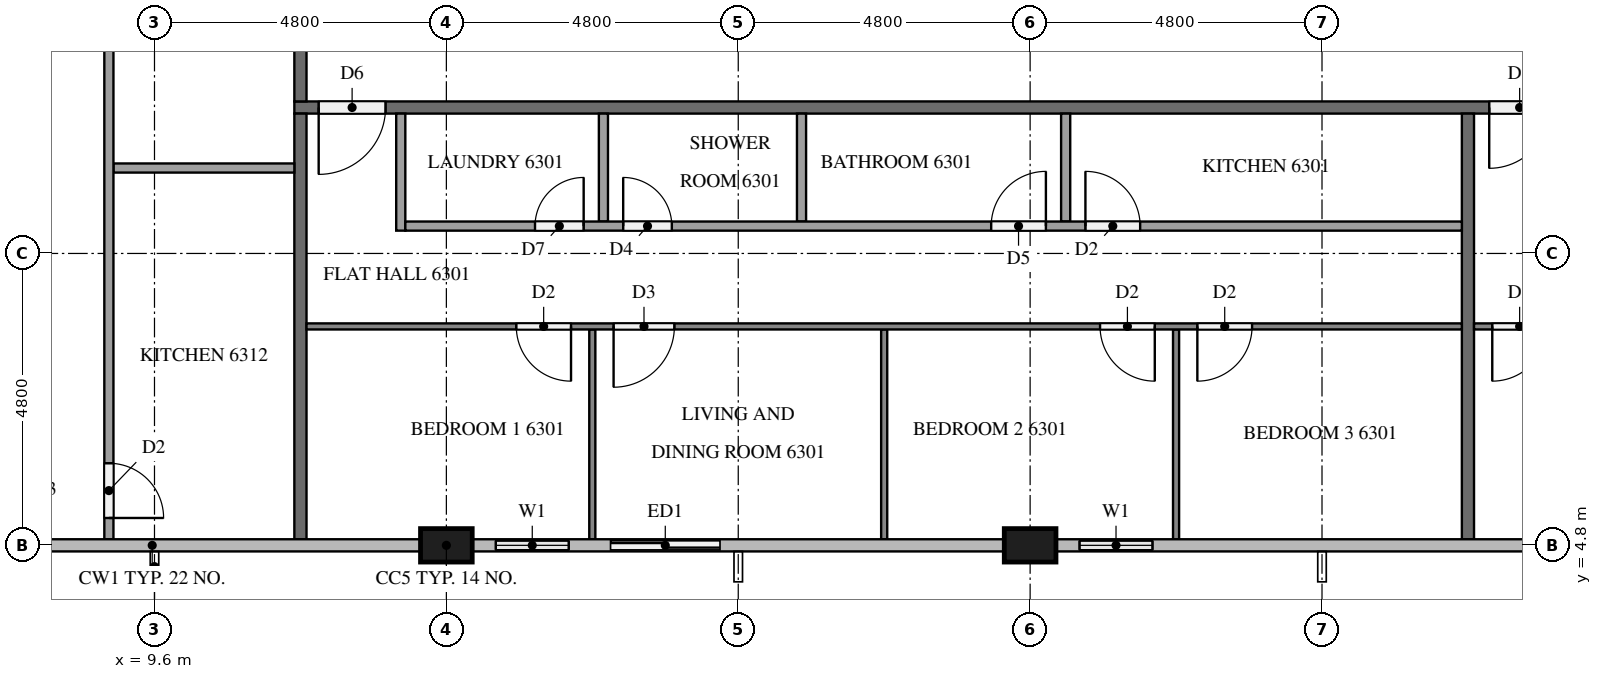
"""IFC4 building model, lengths in metres.
Left out: names, types, materials, properties, quantities, classifications, styles, units other than length and angle.
Written with IfcOpenShell. Run it as: python <this file> out.ifc"""

import sys

from ifc_helpers import new_model, si_unit, direction, frame, frame_2d, origin, origin_2d, place, context, subcontext, project, spatial, rectangle, extrude, element, fill, save


model = new_model("IFC4")
c1 = context("Model", 3, precision=1e-05, world=origin(), true_north=direction((0.0, 1.0)))
c2 = subcontext(c1, "Body", "Model", "MODEL_VIEW")
j1 = project(units=[si_unit("LENGTHUNIT", "METRE"), si_unit("PLANEANGLEUNIT", "RADIAN")], contexts=[c1])
p1 = place(None, origin())
s1 = spatial("IfcSite", under=j1, at=p1, CompositionType="ELEMENT")
p2 = place(p1, origin())
s2 = spatial("IfcBuilding", under=s1, at=p2, CompositionType="ELEMENT")
p3 = place(p2, frame((0.0, 0.0, 242.2)))
s3 = spatial("IfcBuildingStorey", under=s2, at=p3, CompositionType="ELEMENT", Elevation=242.2)
for number, where, z_axis, x_axis in (
    (1, (14.4, 4.8, 0.0), (0.0, 0.0, 1.0), (1.0, 0.0, 0.0)),
    (2, (24.0, 4.8, 0.0), (0.0, 0.0, 1.0), (1.0, 0.0, 0.0)),
):
    element("IfcColumn", number, at=place(p3, frame(where, z_axis=z_axis, x_axis=x_axis)), inside=s3, PredefinedType="COLUMN", context=c2, shape_type="SweptSolid", body=[
        extrude(rectangle(XDim=0.85, YDim=0.55, at=origin_2d()), origin(), (0.0, 0.0, 1.0), 3.2),
    ])
p4 = place(p3, frame((14.825, 4.8, 0.0), z_axis=(0.0, 0.0, 1.0), x_axis=(1.0, 0.0, 0.0)))
e3 = element("IfcWall", 3, at=p4, inside=s3, PredefinedType="SOLIDWALL", context=c2, shape_type="SweptSolid", body=[
    extrude(rectangle(XDim=4.375, YDim=0.15, at=frame_2d((2.188, 0.0))), origin(), (0.0, 0.0, 1.0), 3.2),
])
p5 = place(p4, frame((0.387, 0.0, 0.9)))
e4 = element("IfcOpeningElement", 4, at=p5, cuts=e3, PredefinedType="OPENING", context=c2, shape_type="SweptSolid", body=[
    extrude(rectangle(XDim=1.2, YDim=1.4, at=frame_2d((0.6, 0.7))), frame((0.0, 0.085, 0.0), z_axis=(0.0, -1.0, 0.0), x_axis=(1.0, 0.0, 0.0)), (0.0, 0.0, 1.0), 0.17),
])
p6 = place(p4, frame((2.275, 0.0, 0.0)))
e5 = element("IfcOpeningElement", 5, at=p6, cuts=e3, PredefinedType="OPENING", context=c2, shape_type="SweptSolid", body=[
    extrude(rectangle(XDim=1.8, YDim=2.4, at=frame_2d((0.9, 1.2))), frame((0.0, 0.085, 0.0), z_axis=(0.0, -1.0, 0.0), x_axis=(1.0, 0.0, 0.0)), (0.0, 0.0, 1.0), 0.17),
])
p7 = place(p3, frame((24.425, 4.8, 0.0), z_axis=(0.0, 0.0, 1.0), x_axis=(1.0, 0.0, 0.0)))
e6 = element("IfcWall", 6, at=p7, inside=s3, PredefinedType="SOLIDWALL", context=c2, shape_type="SweptSolid", body=[
    extrude(rectangle(XDim=1.975, YDim=0.15, at=frame_2d((0.987, 0.0))), origin(), (0.0, 0.0, 1.0), 3.2),
])
p8 = place(p7, frame((0.387, 0.0, 0.9)))
e7 = element("IfcOpeningElement", 7, at=p8, cuts=e6, PredefinedType="OPENING", context=c2, shape_type="SweptSolid", body=[
    extrude(rectangle(XDim=1.2, YDim=1.4, at=frame_2d((0.6, 0.7))), frame((0.0, 0.085, 0.0), z_axis=(0.0, -1.0, 0.0), x_axis=(1.0, 0.0, 0.0)), (0.0, 0.0, 1.0), 0.17),
])
p9 = place(p3, frame((50.5, 12.0, 0.0), z_axis=(0.0, 0.0, 1.0), x_axis=(-1.0, 0.0, 0.0)))
e8 = element("IfcWall", 8, at=p9, inside=s3, PredefinedType="PARTITIONING", context=c2, shape_type="SweptSolid", body=[
    extrude(rectangle(XDim=38.6, YDim=0.2, at=frame_2d((19.3, 0.0))), origin(), (0.0, 0.0, 1.0), 3.2),
])
p10 = place(p9, frame((37.1, 0.0, 0.0)))
e9 = element("IfcOpeningElement", 9, at=p10, cuts=e8, PredefinedType="OPENING", context=c2, shape_type="SweptSolid", body=[
    extrude(rectangle(XDim=1.1, YDim=2.1, at=frame_2d((0.55, 1.05))), frame((0.0, 0.11, 0.0), z_axis=(0.0, -1.0, 0.0), x_axis=(1.0, 0.0, 0.0)), (0.0, 0.0, 1.0), 0.22),
])
p11 = place(p9, frame((17.95, 0.0, 0.0)))
e10 = element("IfcOpeningElement", 10, at=p11, cuts=e8, PredefinedType="OPENING", context=c2, shape_type="SweptSolid", body=[
    extrude(rectangle(XDim=1.0, YDim=2.1, at=frame_2d((0.5, 1.05))), frame((0.0, 0.11, 0.0), z_axis=(0.0, -1.0, 0.0), x_axis=(1.0, 0.0, 0.0)), (0.0, 0.0, 1.0), 0.22),
])
p12 = place(p9, frame((8.35, 0.0, 0.0)))
e11 = element("IfcOpeningElement", 11, at=p12, cuts=e8, PredefinedType="OPENING", context=c2, shape_type="SweptSolid", body=[
    extrude(rectangle(XDim=1.0, YDim=2.1, at=frame_2d((0.5, 1.05))), frame((0.0, 0.11, 0.0), z_axis=(0.0, -1.0, 0.0), x_axis=(1.0, 0.0, 0.0)), (0.0, 0.0, 1.0), 0.22),
])
p13 = place(p3, frame((12.0, 12.1, 0.0), z_axis=(0.0, 0.0, 1.0), x_axis=(0.0, 1.0, 0.0)))
e12 = element("IfcWall", 12, at=p13, inside=s3, PredefinedType="PARTITIONING", context=c2, shape_type="SweptSolid", body=[
    extrude(rectangle(XDim=28.6, YDim=0.2, at=frame_2d((14.3, 0.0))), origin(), (0.0, 0.0, 1.0), 3.2),
])
p14 = place(p13, frame((27.35, 0.0, 0.0)))
e13 = element("IfcOpeningElement", 13, at=p14, cuts=e12, PredefinedType="OPENING", context=c2, shape_type="SweptSolid", body=[
    extrude(rectangle(XDim=1.0, YDim=2.1, at=frame_2d((0.5, 1.05))), frame((0.0, 0.11, 0.0), z_axis=(0.0, -1.0, 0.0), x_axis=(1.0, 0.0, 0.0)), (0.0, 0.0, 1.0), 0.22),
])
p15 = place(p13, frame((17.75, 0.0, 0.0)))
e14 = element("IfcOpeningElement", 14, at=p15, cuts=e12, PredefinedType="OPENING", context=c2, shape_type="SweptSolid", body=[
    extrude(rectangle(XDim=1.0, YDim=2.1, at=frame_2d((0.5, 1.05))), frame((0.0, 0.11, 0.0), z_axis=(0.0, -1.0, 0.0), x_axis=(1.0, 0.0, 0.0)), (0.0, 0.0, 1.0), 0.22),
])
p16 = place(p13, frame((3.35, 0.0, 0.0)))
e15 = element("IfcOpeningElement", 15, at=p16, cuts=e12, PredefinedType="OPENING", context=c2, shape_type="SweptSolid", body=[
    extrude(rectangle(XDim=1.0, YDim=2.1, at=frame_2d((0.5, 1.05))), frame((0.0, 0.11, 0.0), z_axis=(0.0, -1.0, 0.0), x_axis=(1.0, 0.0, 0.0)), (0.0, 0.0, 1.0), 0.22),
])
for number, where, z_axis, x_axis in (
    (16, (31.2, 11.9, 0.0), (0.0, 0.0, 1.0), (0.0, -1.0, 0.0)),
    (17, (12.0, 4.9, 0.0), (0.0, 0.0, 1.0), (0.0, 1.0, 0.0)),
):
    element("IfcWall", number, at=place(p3, frame(where, z_axis=z_axis, x_axis=x_axis)), inside=s3, PredefinedType="PARTITIONING", context=c2, shape_type="SweptSolid", body=[
        extrude(rectangle(XDim=7.0, YDim=0.2, at=frame_2d((3.5, 0.0))), origin(), (0.0, 0.0, 1.0), 3.2),
    ])
for number, where, z_axis, x_axis in (
    (18, (16.8, 8.35, 0.0), (0.0, 0.0, 1.0), (0.0, -1.0, 0.0)),
    (19, (21.6, 8.35, 0.0), (0.0, 0.0, 1.0), (0.0, -1.0, 0.0)),
    (20, (26.4, 8.35, 0.0), (0.0, 0.0, 1.0), (0.0, -1.0, 0.0)),
):
    element("IfcWall", number, at=place(p3, frame(where, z_axis=z_axis, x_axis=x_axis)), inside=s3, PredefinedType="PARTITIONING", context=c2, shape_type="SweptSolid", body=[
        extrude(rectangle(XDim=3.45, YDim=0.1, at=frame_2d((1.725, 0.0))), origin(), (0.0, 0.0, 1.0), 3.2),
    ])
p17 = place(p3, frame((31.1, 8.4, 0.0), z_axis=(0.0, 0.0, 1.0), x_axis=(-1.0, 0.0, 0.0)))
e21 = element("IfcWall", 21, at=p17, inside=s3, PredefinedType="PARTITIONING", context=c2, shape_type="SweptSolid", body=[
    extrude(rectangle(XDim=19.0, YDim=0.1, at=frame_2d((9.5, 0.0))), origin(), (0.0, 0.0, 1.0), 3.2),
])
p18 = place(p17, frame((14.65, 0.0, 0.0)))
e22 = element("IfcOpeningElement", 22, at=p18, cuts=e21, PredefinedType="OPENING", context=c2, shape_type="SweptSolid", body=[
    extrude(rectangle(XDim=0.9, YDim=2.1, at=frame_2d((0.45, 1.05))), frame((0.0, 0.06, 0.0), z_axis=(0.0, -1.0, 0.0), x_axis=(1.0, 0.0, 0.0)), (0.0, 0.0, 1.0), 0.12),
])
p19 = place(p17, frame((12.95, 0.0, 0.0)))
e23 = element("IfcOpeningElement", 23, at=p19, cuts=e21, PredefinedType="OPENING", context=c2, shape_type="SweptSolid", body=[
    extrude(rectangle(XDim=1.0, YDim=2.1, at=frame_2d((0.5, 1.05))), frame((0.0, 0.06, 0.0), z_axis=(0.0, -1.0, 0.0), x_axis=(1.0, 0.0, 0.0)), (0.0, 0.0, 1.0), 0.12),
])
p20 = place(p17, frame((5.05, 0.0, 0.0)))
e24 = element("IfcOpeningElement", 24, at=p20, cuts=e21, PredefinedType="OPENING", context=c2, shape_type="SweptSolid", body=[
    extrude(rectangle(XDim=0.9, YDim=2.1, at=frame_2d((0.45, 1.05))), frame((0.0, 0.06, 0.0), z_axis=(0.0, -1.0, 0.0), x_axis=(1.0, 0.0, 0.0)), (0.0, 0.0, 1.0), 0.12),
])
p21 = place(p17, frame((3.45, 0.0, 0.0)))
e25 = element("IfcOpeningElement", 25, at=p21, cuts=e21, PredefinedType="OPENING", context=c2, shape_type="SweptSolid", body=[
    extrude(rectangle(XDim=0.9, YDim=2.1, at=frame_2d((0.45, 1.05))), frame((0.0, 0.06, 0.0), z_axis=(0.0, -1.0, 0.0), x_axis=(1.0, 0.0, 0.0)), (0.0, 0.0, 1.0), 0.12),
])
for number, where, z_axis, x_axis in (
    (26, (16.983, 11.9, 0.0), (0.0, 0.0, 1.0), (0.0, -1.0, 0.0)),
    (27, (20.24, 11.9, 0.0), (0.0, 0.0, 1.0), (0.0, -1.0, 0.0)),
    (28, (24.584, 11.9, 0.0), (0.0, 0.0, 1.0), (0.0, -1.0, 0.0)),
):
    element("IfcWall", number, at=place(p3, frame(where, z_axis=z_axis, x_axis=x_axis)), inside=s3, PredefinedType="PARTITIONING", context=c2, shape_type="SweptSolid", body=[
        extrude(rectangle(XDim=1.775, YDim=0.15, at=frame_2d((0.887, 0.0))), origin(), (0.0, 0.0, 1.0), 3.2),
    ])
p22 = place(p3, frame((13.65, 11.9, 0.0), z_axis=(0.0, 0.0, 1.0), x_axis=(0.0, -1.0, 0.0)))
e29 = element("IfcWall", 29, at=p22, inside=s3, PredefinedType="PARTITIONING", context=c2, shape_type="SweptSolid", body=[
    extrude(rectangle(XDim=1.925, YDim=0.15, at=frame_2d((0.962, 0.0))), origin(), (0.0, 0.0, 1.0), 3.2),
])
p23 = place(p3, frame((13.725, 10.05, 0.0), z_axis=(0.0, 0.0, 1.0), x_axis=(1.0, 0.0, 0.0)))
e30 = element("IfcWall", 30, at=p23, inside=s3, PredefinedType="PARTITIONING", context=c2, shape_type="SweptSolid", body=[
    extrude(rectangle(XDim=17.375, YDim=0.15, at=frame_2d((8.688, 0.0))), origin(), (0.0, 0.0, 1.0), 3.2),
])
p24 = place(p23, frame((2.133, 0.0, 0.0)))
e31 = element("IfcOpeningElement", 31, at=p24, cuts=e30, PredefinedType="OPENING", context=c2, shape_type="SweptSolid", body=[
    extrude(rectangle(XDim=0.8, YDim=2.1, at=frame_2d((0.4, 1.05))), frame((0.0, 0.085, 0.0), z_axis=(0.0, -1.0, 0.0), x_axis=(1.0, 0.0, 0.0)), (0.0, 0.0, 1.0), 0.17),
])
p25 = place(p23, frame((3.583, 0.0, 0.0)))
e32 = element("IfcOpeningElement", 32, at=p25, cuts=e30, PredefinedType="OPENING", context=c2, shape_type="SweptSolid", body=[
    extrude(rectangle(XDim=0.8, YDim=2.1, at=frame_2d((0.4, 1.05))), frame((0.0, 0.085, 0.0), z_axis=(0.0, -1.0, 0.0), x_axis=(1.0, 0.0, 0.0)), (0.0, 0.0, 1.0), 0.17),
])
p26 = place(p23, frame((9.635, 0.0, 0.0)))
e33 = element("IfcOpeningElement", 33, at=p26, cuts=e30, PredefinedType="OPENING", context=c2, shape_type="SweptSolid", body=[
    extrude(rectangle(XDim=0.9, YDim=2.1, at=frame_2d((0.45, 1.05))), frame((0.0, 0.085, 0.0), z_axis=(0.0, -1.0, 0.0), x_axis=(1.0, 0.0, 0.0)), (0.0, 0.0, 1.0), 0.17),
])
p27 = place(p23, frame((11.184, 0.0, 0.0)))
e34 = element("IfcOpeningElement", 34, at=p27, cuts=e30, PredefinedType="OPENING", context=c2, shape_type="SweptSolid", body=[
    extrude(rectangle(XDim=0.9, YDim=2.1, at=frame_2d((0.45, 1.05))), frame((0.0, 0.085, 0.0), z_axis=(0.0, -1.0, 0.0), x_axis=(1.0, 0.0, 0.0)), (0.0, 0.0, 1.0), 0.17),
])
p28 = place(p3, frame((40.7, 8.4, 0.0), z_axis=(0.0, 0.0, 1.0), x_axis=(-1.0, 0.0, 0.0)))
e35 = element("IfcWall", 35, at=p28, inside=s3, PredefinedType="PARTITIONING", context=c2, shape_type="SweptSolid", body=[
    extrude(rectangle(XDim=9.4, YDim=0.1, at=frame_2d((4.7, 0.0))), origin(), (0.0, 0.0, 1.0), 3.2),
])
p29 = place(p28, frame((8.2, 0.0, 0.0)))
e36 = element("IfcOpeningElement", 36, at=p29, cuts=e35, PredefinedType="OPENING", context=c2, shape_type="SweptSolid", body=[
    extrude(rectangle(XDim=0.9, YDim=2.1, at=frame_2d((0.45, 1.05))), frame((0.0, 0.06, 0.0), z_axis=(0.0, -1.0, 0.0), x_axis=(1.0, 0.0, 0.0)), (0.0, 0.0, 1.0), 0.12),
])
p30 = place(p28, frame((0.3, 0.0, 0.0)))
e37 = element("IfcOpeningElement", 37, at=p30, cuts=e35, PredefinedType="OPENING", context=c2, shape_type="SweptSolid", body=[
    extrude(rectangle(XDim=1.0, YDim=2.1, at=frame_2d((0.5, 1.05))), frame((0.0, 0.06, 0.0), z_axis=(0.0, -1.0, 0.0), x_axis=(1.0, 0.0, 0.0)), (0.0, 0.0, 1.0), 0.12),
])
p31 = place(p3, frame((11.9, 11.005, 0.0), z_axis=(0.0, 0.0, 1.0), x_axis=(-1.0, 0.0, 0.0)))
e38 = element("IfcWall", 38, at=p31, inside=s3, PredefinedType="PARTITIONING", context=c2, shape_type="SweptSolid", body=[
    extrude(rectangle(XDim=2.975, YDim=0.15, at=frame_2d((1.487, 0.0))), origin(), (0.0, 0.0, 1.0), 3.2),
])
p32 = place(p3, frame((8.85, 15.075, 0.0), z_axis=(0.0, 0.0, 1.0), x_axis=(0.0, -1.0, 0.0)))
e39 = element("IfcWall", 39, at=p32, inside=s3, PredefinedType="PARTITIONING", context=c2, shape_type="SweptSolid", body=[
    extrude(rectangle(XDim=10.175, YDim=0.15, at=frame_2d((5.087, 0.0))), origin(), (0.0, 0.0, 1.0), 3.2),
])
p33 = place(p32, frame((0.3, 0.0, 0.0)))
e40 = element("IfcOpeningElement", 40, at=p33, cuts=e39, PredefinedType="OPENING", context=c2, shape_type="SweptSolid", body=[
    extrude(rectangle(XDim=0.8, YDim=2.1, at=frame_2d((0.4, 1.05))), frame((0.0, 0.085, 0.0), z_axis=(0.0, -1.0, 0.0), x_axis=(1.0, 0.0, 0.0)), (0.0, 0.0, 1.0), 0.17),
])
p34 = place(p32, frame((8.925, 0.0, 0.0)))
e41 = element("IfcOpeningElement", 41, at=p34, cuts=e39, PredefinedType="OPENING", context=c2, shape_type="SweptSolid", body=[
    extrude(rectangle(XDim=0.9, YDim=2.1, at=frame_2d((0.45, 1.05))), frame((0.0, 0.085, 0.0), z_axis=(0.0, -1.0, 0.0), x_axis=(1.0, 0.0, 0.0)), (0.0, 0.0, 1.0), 0.17),
])
p35 = place(p5, origin())
e42 = element("IfcWindow", 42, at=p35, inside=s3, PartitioningType="SINGLE_PANEL", PredefinedType="WINDOW", context=c2, shape_type="SweptSolid", body=[
    extrude(rectangle(XDim=1.2, YDim=1.4, at=frame_2d((0.6, 0.7))), frame((0.0, 0.03, 0.0), z_axis=(0.0, -1.0, 0.0), x_axis=(1.0, 0.0, 0.0)), (0.0, 0.0, 1.0), 0.06),
])
fill(e4, e42)
p36 = place(p6, origin())
e43 = element("IfcDoor", 43, at=p36, inside=s3, OperationType="SLIDING_TO_LEFT", PredefinedType="DOOR", context=c2, shape_type="SweptSolid", body=[
    extrude(rectangle(XDim=1.8, YDim=2.4, at=frame_2d((0.9, 1.2))), frame((0.0, 0.025, 0.0), z_axis=(0.0, -1.0, 0.0), x_axis=(1.0, 0.0, 0.0)), (0.0, 0.0, 1.0), 0.05),
])
fill(e5, e43)
p37 = place(p8, origin())
e44 = element("IfcWindow", 44, at=p37, inside=s3, PartitioningType="SINGLE_PANEL", PredefinedType="WINDOW", context=c2, shape_type="SweptSolid", body=[
    extrude(rectangle(XDim=1.2, YDim=1.4, at=frame_2d((0.6, 0.7))), frame((0.0, 0.03, 0.0), z_axis=(0.0, -1.0, 0.0), x_axis=(1.0, 0.0, 0.0)), (0.0, 0.0, 1.0), 0.06),
])
fill(e7, e44)
p38 = place(p10, origin())
e45 = element("IfcDoor", 45, at=p38, inside=s3, OperationType="SINGLE_SWING_RIGHT", PredefinedType="DOOR", context=c2, shape_type="SweptSolid", body=[
    extrude(rectangle(XDim=1.1, YDim=2.1, at=frame_2d((0.55, 1.05))), frame((0.0, 0.025, 0.0), z_axis=(0.0, -1.0, 0.0), x_axis=(1.0, 0.0, 0.0)), (0.0, 0.0, 1.0), 0.05),
])
fill(e9, e45)
p39 = place(p11, origin())
e46 = element("IfcDoor", 46, at=p39, inside=s3, OperationType="SINGLE_SWING_RIGHT", PredefinedType="DOOR", context=c2, shape_type="SweptSolid", body=[
    extrude(rectangle(XDim=1.0, YDim=2.1, at=frame_2d((0.5, 1.05))), frame((0.0, 0.025, 0.0), z_axis=(0.0, -1.0, 0.0), x_axis=(1.0, 0.0, 0.0)), (0.0, 0.0, 1.0), 0.05),
])
fill(e10, e46)
p40 = place(p18, origin())
e47 = element("IfcDoor", 47, at=p40, inside=s3, OperationType="SINGLE_SWING_LEFT", PredefinedType="DOOR", context=c2, shape_type="SweptSolid", body=[
    extrude(rectangle(XDim=0.9, YDim=2.1, at=frame_2d((0.45, 1.05))), frame((0.0, 0.025, 0.0), z_axis=(0.0, -1.0, 0.0), x_axis=(1.0, 0.0, 0.0)), (0.0, 0.0, 1.0), 0.05),
])
fill(e22, e47)
p41 = place(p19, origin())
e48 = element("IfcDoor", 48, at=p41, inside=s3, OperationType="SINGLE_SWING_RIGHT", PredefinedType="DOOR", context=c2, shape_type="SweptSolid", body=[
    extrude(rectangle(XDim=1.0, YDim=2.1, at=frame_2d((0.5, 1.05))), frame((0.0, 0.025, 0.0), z_axis=(0.0, -1.0, 0.0), x_axis=(1.0, 0.0, 0.0)), (0.0, 0.0, 1.0), 0.05),
])
fill(e23, e48)
p42 = place(p20, origin())
e49 = element("IfcDoor", 49, at=p42, inside=s3, OperationType="SINGLE_SWING_LEFT", PredefinedType="DOOR", context=c2, shape_type="SweptSolid", body=[
    extrude(rectangle(XDim=0.9, YDim=2.1, at=frame_2d((0.45, 1.05))), frame((0.0, 0.025, 0.0), z_axis=(0.0, -1.0, 0.0), x_axis=(1.0, 0.0, 0.0)), (0.0, 0.0, 1.0), 0.05),
])
fill(e24, e49)
p43 = place(p21, origin())
e50 = element("IfcDoor", 50, at=p43, inside=s3, OperationType="SINGLE_SWING_RIGHT", PredefinedType="DOOR", context=c2, shape_type="SweptSolid", body=[
    extrude(rectangle(XDim=0.9, YDim=2.1, at=frame_2d((0.45, 1.05))), frame((0.0, 0.025, 0.0), z_axis=(0.0, -1.0, 0.0), x_axis=(1.0, 0.0, 0.0)), (0.0, 0.0, 1.0), 0.05),
])
fill(e25, e50)
p44 = place(p24, origin())
e51 = element("IfcDoor", 51, at=p44, inside=s3, OperationType="SINGLE_SWING_RIGHT", PredefinedType="DOOR", context=c2, shape_type="SweptSolid", body=[
    extrude(rectangle(XDim=0.8, YDim=2.1, at=frame_2d((0.4, 1.05))), frame((0.0, 0.025, 0.0), z_axis=(0.0, -1.0, 0.0), x_axis=(1.0, 0.0, 0.0)), (0.0, 0.0, 1.0), 0.05),
])
fill(e31, e51)
p45 = place(p25, origin())
e52 = element("IfcDoor", 52, at=p45, inside=s3, OperationType="SINGLE_SWING_LEFT", PredefinedType="DOOR", context=c2, shape_type="SweptSolid", body=[
    extrude(rectangle(XDim=0.8, YDim=2.1, at=frame_2d((0.4, 1.05))), frame((0.0, 0.025, 0.0), z_axis=(0.0, -1.0, 0.0), x_axis=(1.0, 0.0, 0.0)), (0.0, 0.0, 1.0), 0.05),
])
fill(e32, e52)
p46 = place(p26, origin())
e53 = element("IfcDoor", 53, at=p46, inside=s3, OperationType="SINGLE_SWING_RIGHT", PredefinedType="DOOR", context=c2, shape_type="SweptSolid", body=[
    extrude(rectangle(XDim=0.9, YDim=2.1, at=frame_2d((0.45, 1.05))), frame((0.0, 0.025, 0.0), z_axis=(0.0, -1.0, 0.0), x_axis=(1.0, 0.0, 0.0)), (0.0, 0.0, 1.0), 0.05),
])
fill(e33, e53)
p47 = place(p27, origin())
e54 = element("IfcDoor", 54, at=p47, inside=s3, OperationType="SINGLE_SWING_LEFT", PredefinedType="DOOR", context=c2, shape_type="SweptSolid", body=[
    extrude(rectangle(XDim=0.9, YDim=2.1, at=frame_2d((0.45, 1.05))), frame((0.0, 0.025, 0.0), z_axis=(0.0, -1.0, 0.0), x_axis=(1.0, 0.0, 0.0)), (0.0, 0.0, 1.0), 0.05),
])
fill(e34, e54)
p48 = place(p29, origin())
e55 = element("IfcDoor", 55, at=p48, inside=s3, OperationType="SINGLE_SWING_RIGHT", PredefinedType="DOOR", context=c2, shape_type="SweptSolid", body=[
    extrude(rectangle(XDim=0.9, YDim=2.1, at=frame_2d((0.45, 1.05))), frame((0.0, 0.025, 0.0), z_axis=(0.0, -1.0, 0.0), x_axis=(1.0, 0.0, 0.0)), (0.0, 0.0, 1.0), 0.05),
])
fill(e36, e55)
p49 = place(p34, origin())
e56 = element("IfcDoor", 56, at=p49, inside=s3, OperationType="SINGLE_SWING_RIGHT", PredefinedType="DOOR", context=c2, shape_type="SweptSolid", body=[
    extrude(rectangle(XDim=0.9, YDim=2.1, at=frame_2d((0.45, 1.05))), frame((0.0, 0.025, 0.0), z_axis=(0.0, -1.0, 0.0), x_axis=(1.0, 0.0, 0.0)), (0.0, 0.0, 1.0), 0.05),
])
fill(e41, e56)
save(model, sys.argv[1])
